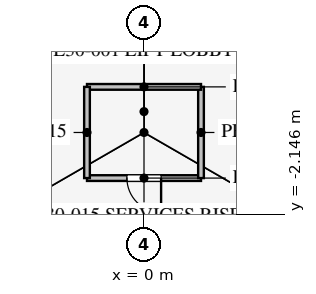
"""IFC4 building model, lengths in metres.
Left out: names, types, materials, properties, quantities, classifications, styles, units other than length and angle.
Written with IfcOpenShell. Run it as: python <this file> out.ifc"""

import sys

from ifc_helpers import new_model, si_unit, direction, frame, frame_2d, origin, place, context, subcontext, project, spatial, rectangle, extrude, element, fill, save


model = new_model("IFC4")
c1 = context("Model", 3, precision=1e-05, world=origin(), true_north=direction((0.0, 1.0)))
c2 = subcontext(c1, "Body", "Model", "MODEL_VIEW")
j1 = project(units=[si_unit("LENGTHUNIT", "METRE"), si_unit("PLANEANGLEUNIT", "RADIAN")], contexts=[c1])
p1 = place(None, origin())
s1 = spatial("IfcSite", under=j1, at=p1, CompositionType="ELEMENT")
p2 = place(p1, origin())
s2 = spatial("IfcBuilding", under=s1, at=p2, CompositionType="ELEMENT")
p3 = place(p2, frame((0.0, 0.0, 132.5)))
s3 = spatial("IfcBuildingStorey", under=s2, at=p3, CompositionType="ELEMENT", Elevation=132.5)
p4 = place(p3, frame((-1.5, -1.2, 0.0), z_axis=(0.0, 0.0, 1.0), x_axis=(1.0, 0.0, 0.0)))
e1 = element("IfcWall", 1, at=p4, inside=s3, PredefinedType="PARTITIONING", context=c2, shape_type="SweptSolid", body=[
    extrude(rectangle(XDim=3.0, YDim=0.15, at=frame_2d((1.5, 0.0))), origin(), (0.0, 0.0, 1.0), 4.0),
])
p5 = place(p4, frame((1.05, 0.0, 0.0)))
e2 = element("IfcOpeningElement", 2, at=p5, cuts=e1, PredefinedType="OPENING", context=c2, shape_type="SweptSolid", body=[
    extrude(rectangle(XDim=0.9, YDim=2.1, at=frame_2d((0.45, 1.05))), frame((0.0, 0.085, 0.0), z_axis=(0.0, -1.0, 0.0), x_axis=(1.0, 0.0, 0.0)), (0.0, 0.0, 1.0), 0.17),
])
p6 = place(p3, frame((1.5, -1.2, 0.0), z_axis=(0.0, 0.0, 1.0), x_axis=(0.0, 1.0, 0.0)))
e3 = element("IfcWall", 3, at=p6, inside=s3, PredefinedType="PARTITIONING", context=c2, shape_type="SweptSolid", body=[
    extrude(rectangle(XDim=2.4, YDim=0.15, at=frame_2d((1.2, 0.0))), origin(), (0.0, 0.0, 1.0), 4.0),
])
p7 = place(p3, frame((1.5, 1.2, 0.0), z_axis=(0.0, 0.0, 1.0), x_axis=(-1.0, 0.0, 0.0)))
e4 = element("IfcWall", 4, at=p7, inside=s3, PredefinedType="PARTITIONING", context=c2, shape_type="SweptSolid", body=[
    extrude(rectangle(XDim=3.0, YDim=0.15, at=frame_2d((1.5, 0.0))), origin(), (0.0, 0.0, 1.0), 4.0),
])
p8 = place(p3, frame((-1.5, 1.2, 0.0), z_axis=(0.0, 0.0, 1.0), x_axis=(0.0, -1.0, 0.0)))
e5 = element("IfcWall", 5, at=p8, inside=s3, PredefinedType="PARTITIONING", context=c2, shape_type="SweptSolid", body=[
    extrude(rectangle(XDim=2.4, YDim=0.15, at=frame_2d((1.2, 0.0))), origin(), (0.0, 0.0, 1.0), 4.0),
])
p9 = place(p3, frame((26.415, -15.231, 0.0), z_axis=(0.0, 0.0, 1.0), x_axis=(-0.50000091641, 0.866024874695, 0.0)))
e6 = element("IfcWall", 6, at=p9, inside=s3, PredefinedType="PARTITIONING", context=c2, shape_type="SweptSolid", body=[
    extrude(rectangle(XDim=52.796, YDim=0.12, at=frame_2d((26.398, 0.0))), origin(), (0.0, 0.0, 1.0), 2.9),
])
p10 = place(p9, frame((10.2, 0.0, 0.15)))
e7 = element("IfcOpeningElement", 7, at=p10, cuts=e6, PredefinedType="OPENING", context=c2, shape_type="SweptSolid", body=[
    extrude(rectangle(XDim=1.8, YDim=2.1, at=frame_2d((0.9, 1.05))), frame((0.0, 0.07, 0.0), z_axis=(0.0, -1.0, 0.0), x_axis=(1.0, 0.0, 0.0)), (0.0, 0.0, 1.0), 0.14),
])
p11 = place(p9, frame((40.8, 0.0, 0.15)))
e8 = element("IfcOpeningElement", 8, at=p11, cuts=e6, PredefinedType="OPENING", context=c2, shape_type="SweptSolid", body=[
    extrude(rectangle(XDim=1.8, YDim=2.1, at=frame_2d((0.9, 1.05))), frame((0.0, 0.07, 0.0), z_axis=(0.0, -1.0, 0.0), x_axis=(1.0, 0.0, 0.0)), (0.0, 0.0, 1.0), 0.14),
])
p12 = place(p3, frame((-0.016, 30.491, 0.0), z_axis=(0.0, 0.0, 1.0), x_axis=(-0.50000091641, -0.866024874695, 0.0)))
e9 = element("IfcWall", 9, at=p12, inside=s3, PredefinedType="PARTITIONING", context=c2, shape_type="SweptSolid", body=[
    extrude(rectangle(XDim=52.796, YDim=0.12, at=frame_2d((26.398, 0.0))), origin(), (0.0, 0.0, 1.0), 2.9),
])
p13 = place(p12, frame((10.2, 0.0, 0.15)))
e10 = element("IfcOpeningElement", 10, at=p13, cuts=e9, PredefinedType="OPENING", context=c2, shape_type="SweptSolid", body=[
    extrude(rectangle(XDim=1.8, YDim=2.1, at=frame_2d((0.9, 1.05))), frame((0.0, 0.07, 0.0), z_axis=(0.0, -1.0, 0.0), x_axis=(1.0, 0.0, 0.0)), (0.0, 0.0, 1.0), 0.14),
])
p14 = place(p12, frame((40.8, 0.0, 0.15)))
e11 = element("IfcOpeningElement", 11, at=p14, cuts=e9, PredefinedType="OPENING", context=c2, shape_type="SweptSolid", body=[
    extrude(rectangle(XDim=1.8, YDim=2.1, at=frame_2d((0.9, 1.05))), frame((0.0, 0.07, 0.0), z_axis=(0.0, -1.0, 0.0), x_axis=(1.0, 0.0, 0.0)), (0.0, 0.0, 1.0), 0.14),
])
p15 = place(p5, frame((0.9, 0.0, 0.0), z_axis=(0.0, 0.0, 1.0), x_axis=(-1.0, 0.0, 0.0)))
e12 = element("IfcDoor", 12, at=p15, inside=s3, OperationType="SINGLE_SWING_LEFT", PredefinedType="DOOR", context=c2, shape_type="SweptSolid", body=[
    extrude(rectangle(XDim=0.9, YDim=2.1, at=frame_2d((0.45, 1.05))), frame((0.0, 0.025, 0.0), z_axis=(0.0, -1.0, 0.0), x_axis=(1.0, 0.0, 0.0)), (0.0, 0.0, 1.0), 0.05),
])
fill(e2, e12)
save(model, sys.argv[1])
